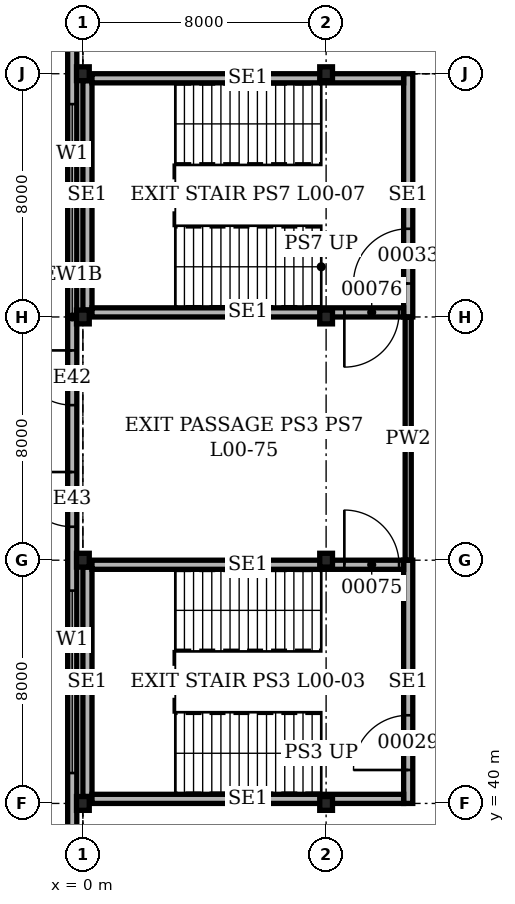
"""IFC4 building model, lengths in metres.
Left out: names, types, materials, properties, quantities, classifications, styles, units other than length and angle.
Written with IfcOpenShell. Run it as: python <this file> out.ifc"""

import sys

from ifc_helpers import new_model, si_unit, direction, frame, frame_2d, origin, origin_2d, place, context, subcontext, project, spatial, rectangle, i_section, extrude, element, fill, save


model = new_model("IFC4")
c1 = context("Model", 3, precision=1e-05, world=origin(), true_north=direction((0.0, 1.0)))
c2 = subcontext(c1, "Body", "Model", "MODEL_VIEW")
j1 = project(units=[si_unit("LENGTHUNIT", "METRE"), si_unit("PLANEANGLEUNIT", "RADIAN")], contexts=[c1])
p1 = place(None, origin())
s1 = spatial("IfcSite", under=j1, at=p1, CompositionType="ELEMENT")
p2 = place(p1, origin())
s2 = spatial("IfcBuilding", under=s1, at=p2, CompositionType="ELEMENT")
p3 = place(p2, origin())
s3 = spatial("IfcBuildingStorey", under=s2, at=p3, CompositionType="ELEMENT", Elevation=0.0)
for number, where, z_axis, x_axis in (
    (1, (0.0, 40.0, 0.0), (0.0, 0.0, 1.0), (1.0, 0.0, 0.0)),
    (2, (0.0, 48.0, 0.0), (0.0, 0.0, 1.0), (1.0, 0.0, 0.0)),
    (3, (0.0, 56.0, 0.0), (0.0, 0.0, 1.0), (1.0, 0.0, 0.0)),
    (4, (0.0, 64.0, 0.0), (0.0, 0.0, 1.0), (1.0, 0.0, 0.0)),
    (5, (8.0, 40.0, 0.0), (0.0, 0.0, 1.0), (1.0, 0.0, 0.0)),
    (6, (8.0, 48.0, 0.0), (0.0, 0.0, 1.0), (1.0, 0.0, 0.0)),
    (7, (8.0, 56.0, 0.0), (0.0, 0.0, 1.0), (1.0, 0.0, 0.0)),
    (8, (8.0, 64.0, 0.0), (0.0, 0.0, 1.0), (1.0, 0.0, 0.0)),
):
    element("IfcColumn", number, at=place(p3, frame(where, z_axis=z_axis, x_axis=x_axis)), inside=s3, PredefinedType="COLUMN", context=c2, shape_type="SweptSolid", body=[
        extrude(i_section(OverallWidth=0.419, OverallDepth=0.455, WebThickness=0.042, FlangeThickness=0.068, at=origin_2d()), origin(), (0.0, 0.0, 1.0), 4.9),
    ])
p4 = place(p3, frame((-0.35, 112.35, 0.0), z_axis=(0.0, 0.0, 1.0), x_axis=(0.0, -1.0, 0.0)))
e9 = element("IfcWall", 9, at=p4, inside=s3, PredefinedType="SOLIDWALL", context=c2, shape_type="SweptSolid", body=[
    extrude(rectangle(XDim=112.7, YDim=0.3, at=frame_2d((56.35, 0.0))), origin(), (0.0, 0.0, 1.0), 4.9),
])
p5 = place(p4, frame((3.45, 0.0, 0.0)))
e10 = element("IfcOpeningElement", 10, at=p5, cuts=e9, PredefinedType="OPENING", context=c2, shape_type="SweptSolid", body=[
    extrude(rectangle(XDim=1.8, YDim=2.4, at=frame_2d((0.9, 1.2))), frame((0.0, 0.16, 0.0), z_axis=(0.0, -1.0, 0.0), x_axis=(1.0, 0.0, 0.0)), (0.0, 0.0, 1.0), 0.32),
])
p6 = place(p4, frame((9.35, 0.0, 1.2)))
e11 = element("IfcOpeningElement", 11, at=p6, cuts=e9, PredefinedType="OPENING", context=c2, shape_type="SweptSolid", body=[
    extrude(rectangle(XDim=6.0, YDim=1.5, at=frame_2d((3.0, 0.75))), frame((0.0, 0.16, 0.0), z_axis=(0.0, -1.0, 0.0), x_axis=(1.0, 0.0, 0.0)), (0.0, 0.0, 1.0), 0.32),
])
p7 = place(p4, frame((17.35, 0.0, 1.2)))
e12 = element("IfcOpeningElement", 12, at=p7, cuts=e9, PredefinedType="OPENING", context=c2, shape_type="SweptSolid", body=[
    extrude(rectangle(XDim=6.0, YDim=1.5, at=frame_2d((3.0, 0.75))), frame((0.0, 0.16, 0.0), z_axis=(0.0, -1.0, 0.0), x_axis=(1.0, 0.0, 0.0)), (0.0, 0.0, 1.0), 0.32),
])
p8 = place(p4, frame((25.35, 0.0, 1.2)))
e13 = element("IfcOpeningElement", 13, at=p8, cuts=e9, PredefinedType="OPENING", context=c2, shape_type="SweptSolid", body=[
    extrude(rectangle(XDim=6.0, YDim=1.5, at=frame_2d((3.0, 0.75))), frame((0.0, 0.16, 0.0), z_axis=(0.0, -1.0, 0.0), x_axis=(1.0, 0.0, 0.0)), (0.0, 0.0, 1.0), 0.32),
])
p9 = place(p4, frame((33.35, 0.0, 1.2)))
e14 = element("IfcOpeningElement", 14, at=p9, cuts=e9, PredefinedType="OPENING", context=c2, shape_type="SweptSolid", body=[
    extrude(rectangle(XDim=6.0, YDim=1.5, at=frame_2d((3.0, 0.75))), frame((0.0, 0.16, 0.0), z_axis=(0.0, -1.0, 0.0), x_axis=(1.0, 0.0, 0.0)), (0.0, 0.0, 1.0), 0.32),
])
p10 = place(p4, frame((41.15, 0.0, 0.0)))
e15 = element("IfcOpeningElement", 15, at=p10, cuts=e9, PredefinedType="OPENING", context=c2, shape_type="SweptSolid", body=[
    extrude(rectangle(XDim=2.4, YDim=3.0, at=frame_2d((1.2, 1.5))), frame((0.0, 0.16, 0.0), z_axis=(0.0, -1.0, 0.0), x_axis=(1.0, 0.0, 0.0)), (0.0, 0.0, 1.0), 0.32),
])
p11 = place(p4, frame((45.15, 0.0, 0.0)))
e16 = element("IfcOpeningElement", 16, at=p11, cuts=e9, PredefinedType="OPENING", context=c2, shape_type="SweptSolid", body=[
    extrude(rectangle(XDim=2.4, YDim=3.0, at=frame_2d((1.2, 1.5))), frame((0.0, 0.16, 0.0), z_axis=(0.0, -1.0, 0.0), x_axis=(1.0, 0.0, 0.0)), (0.0, 0.0, 1.0), 0.32),
])
p12 = place(p4, frame((49.35, 0.0, 1.2)))
e17 = element("IfcOpeningElement", 17, at=p12, cuts=e9, PredefinedType="OPENING", context=c2, shape_type="SweptSolid", body=[
    extrude(rectangle(XDim=6.0, YDim=1.5, at=frame_2d((3.0, 0.75))), frame((0.0, 0.16, 0.0), z_axis=(0.0, -1.0, 0.0), x_axis=(1.0, 0.0, 0.0)), (0.0, 0.0, 1.0), 0.32),
])
p13 = place(p4, frame((57.45, 0.0, 0.0)))
e18 = element("IfcOpeningElement", 18, at=p13, cuts=e9, PredefinedType="OPENING", context=c2, shape_type="SweptSolid", body=[
    extrude(rectangle(XDim=1.8, YDim=2.4, at=frame_2d((0.9, 1.2))), frame((0.0, 0.16, 0.0), z_axis=(0.0, -1.0, 0.0), x_axis=(1.0, 0.0, 0.0)), (0.0, 0.0, 1.0), 0.32),
])
p14 = place(p4, frame((61.45, 0.0, 0.0)))
e19 = element("IfcOpeningElement", 19, at=p14, cuts=e9, PredefinedType="OPENING", context=c2, shape_type="SweptSolid", body=[
    extrude(rectangle(XDim=1.8, YDim=2.4, at=frame_2d((0.9, 1.2))), frame((0.0, 0.16, 0.0), z_axis=(0.0, -1.0, 0.0), x_axis=(1.0, 0.0, 0.0)), (0.0, 0.0, 1.0), 0.32),
])
p15 = place(p4, frame((65.35, 0.0, 1.2)))
e20 = element("IfcOpeningElement", 20, at=p15, cuts=e9, PredefinedType="OPENING", context=c2, shape_type="SweptSolid", body=[
    extrude(rectangle(XDim=6.0, YDim=1.5, at=frame_2d((3.0, 0.75))), frame((0.0, 0.16, 0.0), z_axis=(0.0, -1.0, 0.0), x_axis=(1.0, 0.0, 0.0)), (0.0, 0.0, 1.0), 0.32),
])
p16 = place(p4, frame((73.35, 0.0, 1.2)))
e21 = element("IfcOpeningElement", 21, at=p16, cuts=e9, PredefinedType="OPENING", context=c2, shape_type="SweptSolid", body=[
    extrude(rectangle(XDim=6.0, YDim=1.5, at=frame_2d((3.0, 0.75))), frame((0.0, 0.16, 0.0), z_axis=(0.0, -1.0, 0.0), x_axis=(1.0, 0.0, 0.0)), (0.0, 0.0, 1.0), 0.32),
])
p17 = place(p4, frame((81.35, 0.0, 1.2)))
e22 = element("IfcOpeningElement", 22, at=p17, cuts=e9, PredefinedType="OPENING", context=c2, shape_type="SweptSolid", body=[
    extrude(rectangle(XDim=6.0, YDim=1.5, at=frame_2d((3.0, 0.75))), frame((0.0, 0.16, 0.0), z_axis=(0.0, -1.0, 0.0), x_axis=(1.0, 0.0, 0.0)), (0.0, 0.0, 1.0), 0.32),
])
p18 = place(p4, frame((89.35, 0.0, 1.2)))
e23 = element("IfcOpeningElement", 23, at=p18, cuts=e9, PredefinedType="OPENING", context=c2, shape_type="SweptSolid", body=[
    extrude(rectangle(XDim=6.0, YDim=1.5, at=frame_2d((3.0, 0.75))), frame((0.0, 0.16, 0.0), z_axis=(0.0, -1.0, 0.0), x_axis=(1.0, 0.0, 0.0)), (0.0, 0.0, 1.0), 0.32),
])
p19 = place(p4, frame((99.45, 0.0, 0.0)))
e24 = element("IfcOpeningElement", 24, at=p19, cuts=e9, PredefinedType="OPENING", context=c2, shape_type="SweptSolid", body=[
    extrude(rectangle(XDim=1.8, YDim=2.4, at=frame_2d((0.9, 1.2))), frame((0.0, 0.16, 0.0), z_axis=(0.0, -1.0, 0.0), x_axis=(1.0, 0.0, 0.0)), (0.0, 0.0, 1.0), 0.32),
])
p20 = place(p4, frame((107.45, 0.0, 0.0)))
e25 = element("IfcOpeningElement", 25, at=p20, cuts=e9, PredefinedType="OPENING", context=c2, shape_type="SweptSolid", body=[
    extrude(rectangle(XDim=1.8, YDim=2.4, at=frame_2d((0.9, 1.2))), frame((0.0, 0.16, 0.0), z_axis=(0.0, -1.0, 0.0), x_axis=(1.0, 0.0, 0.0)), (0.0, 0.0, 1.0), 0.32),
])
p21 = place(p3, frame((0.15, 40.227, 0.0), z_axis=(0.0, 0.0, 1.0), x_axis=(0.0, 1.0, 0.0)))
e26 = element("IfcWall", 26, at=p21, inside=s3, PredefinedType="SOLIDWALL", context=c2, shape_type="SweptSolid", body=[
    extrude(rectangle(XDim=7.545, YDim=0.3, at=frame_2d((3.773, 0.0))), origin(), (0.0, 0.0, 1.0), 4.7),
])
p22 = place(p3, frame((10.7, 40.0, 0.0), z_axis=(0.0, 0.0, 1.0), x_axis=(0.0, 1.0, 0.0)))
e27 = element("IfcWall", 27, at=p22, inside=s3, PredefinedType="SOLIDWALL", context=c2, shape_type="SweptSolid", body=[
    extrude(rectangle(XDim=8.0, YDim=0.3, at=frame_2d((4.0, 0.0))), origin(), (0.0, 0.0, 1.0), 4.7),
])
p23 = place(p22, frame((1.1, 0.0, 0.0)))
e28 = element("IfcOpeningElement", 28, at=p23, cuts=e27, PredefinedType="OPENING", context=c2, shape_type="SweptSolid", body=[
    extrude(rectangle(XDim=1.8, YDim=2.1, at=frame_2d((0.9, 1.05))), frame((0.0, 0.16, 0.0), z_axis=(0.0, -1.0, 0.0), x_axis=(1.0, 0.0, 0.0)), (0.0, 0.0, 1.0), 0.32),
])
p24 = place(p3, frame((0.3, 40.15, 0.0), z_axis=(0.0, 0.0, 1.0), x_axis=(1.0, 0.0, 0.0)))
e29 = element("IfcWall", 29, at=p24, inside=s3, PredefinedType="SOLIDWALL", context=c2, shape_type="SweptSolid", body=[
    extrude(rectangle(XDim=10.25, YDim=0.3, at=frame_2d((5.125, 0.0))), origin(), (0.0, 0.0, 1.0), 4.7),
])
p25 = place(p3, frame((0.3, 47.85, 0.0), z_axis=(0.0, 0.0, 1.0), x_axis=(1.0, 0.0, 0.0)))
e30 = element("IfcWall", 30, at=p25, inside=s3, PredefinedType="SOLIDWALL", context=c2, shape_type="SweptSolid", body=[
    extrude(rectangle(XDim=10.25, YDim=0.3, at=frame_2d((5.125, 0.0))), origin(), (0.0, 0.0, 1.0), 4.7),
])
p26 = place(p25, frame((8.3, 0.0, 0.0)))
e31 = element("IfcOpeningElement", 31, at=p26, cuts=e30, PredefinedType="OPENING", context=c2, shape_type="SweptSolid", body=[
    extrude(rectangle(XDim=1.8, YDim=2.1, at=frame_2d((0.9, 1.05))), frame((0.0, 0.16, 0.0), z_axis=(0.0, -1.0, 0.0), x_axis=(1.0, 0.0, 0.0)), (0.0, 0.0, 1.0), 0.32),
])
p27 = place(p3, frame((0.15, 56.227, 0.0), z_axis=(0.0, 0.0, 1.0), x_axis=(0.0, 1.0, 0.0)))
e32 = element("IfcWall", 32, at=p27, inside=s3, PredefinedType="SOLIDWALL", context=c2, shape_type="SweptSolid", body=[
    extrude(rectangle(XDim=7.545, YDim=0.3, at=frame_2d((3.773, 0.0))), origin(), (0.0, 0.0, 1.0), 4.7),
])
p28 = place(p3, frame((10.7, 56.0, 0.0), z_axis=(0.0, 0.0, 1.0), x_axis=(0.0, 1.0, 0.0)))
e33 = element("IfcWall", 33, at=p28, inside=s3, PredefinedType="SOLIDWALL", context=c2, shape_type="SweptSolid", body=[
    extrude(rectangle(XDim=8.0, YDim=0.3, at=frame_2d((4.0, 0.0))), origin(), (0.0, 0.0, 1.0), 4.7),
])
p29 = place(p28, frame((1.1, 0.0, 0.0)))
e34 = element("IfcOpeningElement", 34, at=p29, cuts=e33, PredefinedType="OPENING", context=c2, shape_type="SweptSolid", body=[
    extrude(rectangle(XDim=1.8, YDim=2.1, at=frame_2d((0.9, 1.05))), frame((0.0, 0.16, 0.0), z_axis=(0.0, -1.0, 0.0), x_axis=(1.0, 0.0, 0.0)), (0.0, 0.0, 1.0), 0.32),
])
p30 = place(p3, frame((0.3, 56.15, 0.0), z_axis=(0.0, 0.0, 1.0), x_axis=(1.0, 0.0, 0.0)))
e35 = element("IfcWall", 35, at=p30, inside=s3, PredefinedType="SOLIDWALL", context=c2, shape_type="SweptSolid", body=[
    extrude(rectangle(XDim=10.25, YDim=0.3, at=frame_2d((5.125, 0.0))), origin(), (0.0, 0.0, 1.0), 4.7),
])
p31 = place(p30, frame((8.3, 0.0, 0.0)))
e36 = element("IfcOpeningElement", 36, at=p31, cuts=e35, PredefinedType="OPENING", context=c2, shape_type="SweptSolid", body=[
    extrude(rectangle(XDim=1.8, YDim=2.1, at=frame_2d((0.9, 1.05))), frame((0.0, 0.16, 0.0), z_axis=(0.0, -1.0, 0.0), x_axis=(1.0, 0.0, 0.0)), (0.0, 0.0, 1.0), 0.32),
])
p32 = place(p3, frame((0.3, 63.85, 0.0), z_axis=(0.0, 0.0, 1.0), x_axis=(1.0, 0.0, 0.0)))
e37 = element("IfcWall", 37, at=p32, inside=s3, PredefinedType="SOLIDWALL", context=c2, shape_type="SweptSolid", body=[
    extrude(rectangle(XDim=10.25, YDim=0.3, at=frame_2d((5.125, 0.0))), origin(), (0.0, 0.0, 1.0), 4.7),
])
p33 = place(p3, frame((10.7, 48.0, 0.0), z_axis=(0.0, 0.0, 1.0), x_axis=(0.0, 1.0, 0.0)))
e38 = element("IfcWall", 38, at=p33, inside=s3, PredefinedType="PARTITIONING", context=c2, shape_type="SweptSolid", body=[
    extrude(rectangle(XDim=8.0, YDim=0.2, at=frame_2d((4.0, 0.0))), origin(), (0.0, 0.0, 1.0), 4.7),
])
p34 = place(p12, origin())
e39 = element("IfcWindow", 39, at=p34, inside=s3, PartitioningType="SINGLE_PANEL", PredefinedType="WINDOW", context=c2, shape_type="SweptSolid", body=[
    extrude(rectangle(XDim=6.0, YDim=1.5, at=frame_2d((3.0, 0.75))), frame((0.0, 0.03, 0.0), z_axis=(0.0, -1.0, 0.0), x_axis=(1.0, 0.0, 0.0)), (0.0, 0.0, 1.0), 0.06),
])
fill(e17, e39)
p35 = place(p13, frame((1.8, 0.0, 0.0), z_axis=(0.0, 0.0, 1.0), x_axis=(-1.0, 0.0, 0.0)))
e40 = element("IfcDoor", 40, at=p35, inside=s3, OperationType="DOUBLE_DOOR_SINGLE_SWING", PredefinedType="DOOR", context=c2, shape_type="SweptSolid", body=[
    extrude(rectangle(XDim=1.8, YDim=2.4, at=frame_2d((0.9, 1.2))), frame((0.0, 0.15, 0.0), z_axis=(0.0, -1.0, 0.0), x_axis=(1.0, 0.0, 0.0)), (0.0, 0.0, 1.0), 0.3),
])
fill(e18, e40)
p36 = place(p14, frame((1.8, 0.0, 0.0), z_axis=(0.0, 0.0, 1.0), x_axis=(-1.0, 0.0, 0.0)))
e41 = element("IfcDoor", 41, at=p36, inside=s3, OperationType="DOUBLE_DOOR_SINGLE_SWING", PredefinedType="DOOR", context=c2, shape_type="SweptSolid", body=[
    extrude(rectangle(XDim=1.8, YDim=2.4, at=frame_2d((0.9, 1.2))), frame((0.0, 0.15, 0.0), z_axis=(0.0, -1.0, 0.0), x_axis=(1.0, 0.0, 0.0)), (0.0, 0.0, 1.0), 0.3),
])
fill(e19, e41)
p37 = place(p15, origin())
e42 = element("IfcWindow", 42, at=p37, inside=s3, PartitioningType="SINGLE_PANEL", PredefinedType="WINDOW", context=c2, shape_type="SweptSolid", body=[
    extrude(rectangle(XDim=6.0, YDim=1.5, at=frame_2d((3.0, 0.75))), frame((0.0, 0.03, 0.0), z_axis=(0.0, -1.0, 0.0), x_axis=(1.0, 0.0, 0.0)), (0.0, 0.0, 1.0), 0.06),
])
fill(e20, e42)
p38 = place(p23, origin())
e43 = element("IfcDoor", 43, at=p38, inside=s3, OperationType="DOUBLE_DOOR_SINGLE_SWING", PredefinedType="DOOR", context=c2, shape_type="SweptSolid", body=[
    extrude(rectangle(XDim=1.8, YDim=2.1, at=frame_2d((0.9, 1.05))), frame((0.0, 0.15, 0.0), z_axis=(0.0, -1.0, 0.0), x_axis=(1.0, 0.0, 0.0)), (0.0, 0.0, 1.0), 0.3),
])
fill(e28, e43)
p39 = place(p29, origin())
e44 = element("IfcDoor", 44, at=p39, inside=s3, OperationType="DOUBLE_DOOR_SINGLE_SWING", PredefinedType="DOOR", context=c2, shape_type="SweptSolid", body=[
    extrude(rectangle(XDim=1.8, YDim=2.1, at=frame_2d((0.9, 1.05))), frame((0.0, 0.15, 0.0), z_axis=(0.0, -1.0, 0.0), x_axis=(1.0, 0.0, 0.0)), (0.0, 0.0, 1.0), 0.3),
])
fill(e34, e44)
p40 = place(p26, origin())
e45 = element("IfcDoor", 45, at=p40, inside=s3, OperationType="DOUBLE_DOOR_SINGLE_SWING", PredefinedType="DOOR", context=c2, shape_type="SweptSolid", body=[
    extrude(rectangle(XDim=1.8, YDim=2.1, at=frame_2d((0.9, 1.05))), frame((0.0, 0.15, 0.0), z_axis=(0.0, -1.0, 0.0), x_axis=(1.0, 0.0, 0.0)), (0.0, 0.0, 1.0), 0.3),
])
fill(e31, e45)
p41 = place(p31, frame((1.8, 0.0, 0.0), z_axis=(0.0, 0.0, 1.0), x_axis=(-1.0, 0.0, 0.0)))
e46 = element("IfcDoor", 46, at=p41, inside=s3, OperationType="DOUBLE_DOOR_SINGLE_SWING", PredefinedType="DOOR", context=c2, shape_type="SweptSolid", body=[
    extrude(rectangle(XDim=1.8, YDim=2.1, at=frame_2d((0.9, 1.05))), frame((0.0, 0.15, 0.0), z_axis=(0.0, -1.0, 0.0), x_axis=(1.0, 0.0, 0.0)), (0.0, 0.0, 1.0), 0.3),
])
fill(e36, e46)
save(model, sys.argv[1])
